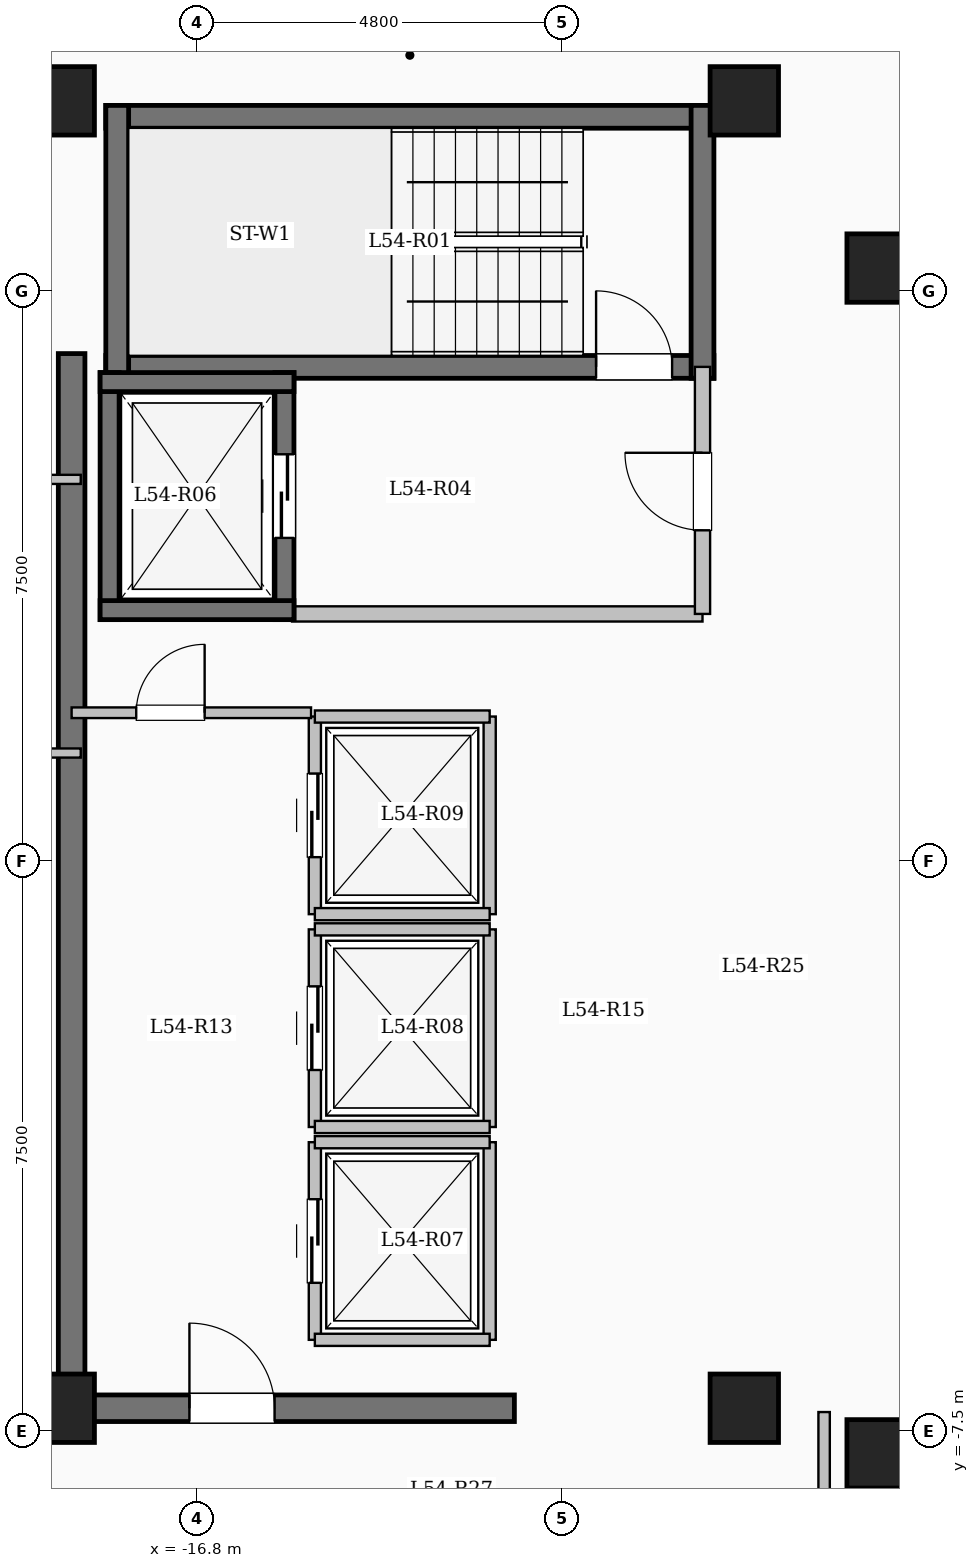
"""IFC4 building model, lengths in metres.
Left out: names, types, materials, properties, quantities, classifications, styles, units other than length and angle.
Written with IfcOpenShell. Run it as: python <this file> out.ifc"""

import sys

from ifc_helpers import new_model, si_unit, direction, frame, frame_2d, origin, origin_2d, place, context, subcontext, project, spatial, rectangle, extrude, element, fill, save


model = new_model("IFC4")
c1 = context("Model", 3, precision=1e-05, world=origin(), true_north=direction((0.0, 1.0)))
c2 = subcontext(c1, "Body", "Model", "MODEL_VIEW")
j1 = project(units=[si_unit("LENGTHUNIT", "METRE"), si_unit("PLANEANGLEUNIT", "RADIAN")], contexts=[c1])
p1 = place(None, origin())
s1 = spatial("IfcSite", under=j1, at=p1, CompositionType="ELEMENT")
p2 = place(p1, origin())
s2 = spatial("IfcBuilding", under=s1, at=p2, CompositionType="ELEMENT")
p3 = place(p2, frame((0.0, 0.0, 200.3)))
s3 = spatial("IfcBuildingStorey", under=s2, at=p3, CompositionType="ELEMENT", Elevation=200.3)
for number, where, z_axis, x_axis in (
    (1, (-7.8, -7.8, 0.0), (0.0, 0.0, 1.0), (1.0, 0.0, 0.0)),
    (2, (-7.8, 7.8, 0.0), (0.0, 0.0, 1.0), (1.0, 0.0, 0.0)),
    (3, (-9.6, -7.2, 0.0), (0.0, 0.0, 1.0), (1.0, 0.0, 0.0)),
    (4, (-9.6, 10.0, 0.0), (0.0, 0.0, 1.0), (1.0, 0.0, 0.0)),
    (5, (-18.6, -7.2, 0.0), (0.0, 0.0, 1.0), (1.0, 0.0, 0.0)),
    (6, (-18.6, 10.0, 0.0), (0.0, 0.0, 1.0), (1.0, 0.0, 0.0)),
):
    element("IfcColumn", number, at=place(p3, frame(where, z_axis=z_axis, x_axis=x_axis)), inside=s3, PredefinedType="COLUMN", context=c2, shape_type="SweptSolid", body=[
        extrude(rectangle(XDim=0.9, YDim=0.9, at=origin_2d()), origin(), (0.0, 0.0, 1.0), 3.35),
    ])
p4 = place(p3, frame((-18.0, 9.79, 0.0), z_axis=(0.0, 0.0, 1.0), x_axis=(1.0, 0.0, 0.0)))
e7 = element("IfcWall", 7, at=p4, inside=s3, PredefinedType="SHEAR", context=c2, shape_type="SweptSolid", body=[
    extrude(rectangle(XDim=8.0, YDim=0.3, at=frame_2d((4.0, 0.0))), origin(), (0.0, 0.0, 1.0), 3.35),
])
p5 = place(p3, frame((-18.0, 6.5, 0.0), z_axis=(0.0, 0.0, 1.0), x_axis=(1.0, 0.0, 0.0)))
e8 = element("IfcWall", 8, at=p5, inside=s3, PredefinedType="SHEAR", context=c2, shape_type="SweptSolid", body=[
    extrude(rectangle(XDim=8.0, YDim=0.3, at=frame_2d((4.0, 0.0))), origin(), (0.0, 0.0, 1.0), 3.35),
])
p6 = place(p5, frame((6.45, 0.0, 0.0)))
e9 = element("IfcOpeningElement", 9, at=p6, cuts=e8, PredefinedType="OPENING", context=c2, shape_type="SweptSolid", body=[
    extrude(rectangle(XDim=1.0, YDim=2.15, at=frame_2d((0.5, 1.075))), frame((0.0, 0.16, 0.0), z_axis=(0.0, -1.0, 0.0), x_axis=(1.0, 0.0, 0.0)), (0.0, 0.0, 1.0), 0.32),
])
for number, where, z_axis, x_axis in (
    (10, (-17.85, 6.35, 0.0), (0.0, 0.0, 1.0), (0.0, 1.0, 0.0)),
    (11, (-10.15, 6.35, 0.0), (0.0, 0.0, 1.0), (0.0, 1.0, 0.0)),
):
    element("IfcWall", number, at=place(p3, frame(where, z_axis=z_axis, x_axis=x_axis)), inside=s3, PredefinedType="SHEAR", context=c2, shape_type="SweptSolid", body=[
        extrude(rectangle(XDim=3.59, YDim=0.3, at=frame_2d((1.795, 0.0))), origin(), (0.0, 0.0, 1.0), 3.35),
    ])
p7 = place(p3, frame((-15.55, 3.25, 0.0), z_axis=(0.0, 0.0, 1.0), x_axis=(1.0, 0.0, 0.0)))
e12 = element("IfcWall", 12, at=p7, inside=s3, PredefinedType="SOLIDWALL", context=c2, shape_type="SweptSolid", body=[
    extrude(rectangle(XDim=5.4, YDim=0.2, at=frame_2d((2.7, 0.0))), origin(), (0.0, 0.0, 1.0), 3.1),
])
p8 = place(p3, frame((-10.15, 3.25, 0.0), z_axis=(0.0, 0.0, 1.0), x_axis=(0.0, 1.0, 0.0)))
e13 = element("IfcWall", 13, at=p8, inside=s3, PredefinedType="SOLIDWALL", context=c2, shape_type="SweptSolid", body=[
    extrude(rectangle(XDim=3.25, YDim=0.2, at=frame_2d((1.625, 0.0))), origin(), (0.0, 0.0, 1.0), 3.1),
])
p9 = place(p8, frame((1.1, 0.0, 0.0)))
e14 = element("IfcOpeningElement", 14, at=p9, cuts=e13, PredefinedType="OPENING", context=c2, shape_type="SweptSolid", body=[
    extrude(rectangle(XDim=1.02, YDim=2.15, at=frame_2d((0.51, 1.075))), frame((0.0, 0.11, 0.0), z_axis=(0.0, -1.0, 0.0), x_axis=(1.0, 0.0, 0.0)), (0.0, 0.0, 1.0), 0.22),
])
p10 = place(p3, frame((-17.95, 3.175, 0.0), z_axis=(0.0, 0.0, 1.0), x_axis=(0.0, 1.0, 0.0)))
e15 = element("IfcWall", 15, at=p10, inside=s3, PredefinedType="SHEAR", context=c2, shape_type="SweptSolid", body=[
    extrude(rectangle(XDim=3.25, YDim=0.25, at=frame_2d((1.625, 0.0))), origin(), (0.0, 0.0, 1.0), 3.35),
])
p11 = place(p3, frame((-15.65, 3.175, 0.0), z_axis=(0.0, 0.0, 1.0), x_axis=(0.0, 1.0, 0.0)))
e16 = element("IfcWall", 16, at=p11, inside=s3, PredefinedType="SHEAR", context=c2, shape_type="SweptSolid", body=[
    extrude(rectangle(XDim=3.25, YDim=0.25, at=frame_2d((1.625, 0.0))), origin(), (0.0, 0.0, 1.0), 3.35),
])
p12 = place(p11, frame((1.075, 0.0, 0.0)))
e17 = element("IfcOpeningElement", 17, at=p12, cuts=e16, PredefinedType="OPENING", context=c2, shape_type="SweptSolid", body=[
    extrude(rectangle(XDim=1.1, YDim=2.15, at=frame_2d((0.55, 1.075))), frame((0.0, 0.135, 0.0), z_axis=(0.0, -1.0, 0.0), x_axis=(1.0, 0.0, 0.0)), (0.0, 0.0, 1.0), 0.27),
])
for number, where, z_axis, x_axis in (
    (18, (-18.075, 3.3, 0.0), (0.0, 0.0, 1.0), (1.0, 0.0, 0.0)),
    (19, (-18.075, 6.3, 0.0), (0.0, 0.0, 1.0), (1.0, 0.0, 0.0)),
):
    element("IfcWall", number, at=place(p3, frame(where, z_axis=z_axis, x_axis=x_axis)), inside=s3, PredefinedType="SHEAR", context=c2, shape_type="SweptSolid", body=[
        extrude(rectangle(XDim=2.55, YDim=0.25, at=frame_2d((1.275, 0.0))), origin(), (0.0, 0.0, 1.0), 3.35),
    ])
p13 = place(p3, frame((-15.25, -6.3, 0.0), z_axis=(0.0, 0.0, 1.0), x_axis=(0.0, 1.0, 0.0)))
e20 = element("IfcWall", 20, at=p13, inside=s3, PredefinedType="SOLIDWALL", context=c2, shape_type="SweptSolid", body=[
    extrude(rectangle(XDim=2.6, YDim=0.16, at=frame_2d((1.3, 0.0))), origin(), (0.0, 0.0, 1.0), 3.1),
])
p14 = place(p13, frame((0.75, 0.0, 0.0)))
e21 = element("IfcOpeningElement", 21, at=p14, cuts=e20, PredefinedType="OPENING", context=c2, shape_type="SweptSolid", body=[
    extrude(rectangle(XDim=1.1, YDim=2.15, at=frame_2d((0.55, 1.075))), frame((0.0, 0.09, 0.0), z_axis=(0.0, -1.0, 0.0), x_axis=(1.0, 0.0, 0.0)), (0.0, 0.0, 1.0), 0.18),
])
p15 = place(p3, frame((-12.95, -6.3, 0.0), z_axis=(0.0, 0.0, 1.0), x_axis=(0.0, 1.0, 0.0)))
e22 = element("IfcWall", 22, at=p15, inside=s3, PredefinedType="SOLIDWALL", context=c2, shape_type="SweptSolid", body=[
    extrude(rectangle(XDim=2.6, YDim=0.16, at=frame_2d((1.3, 0.0))), origin(), (0.0, 0.0, 1.0), 3.1),
])
for number, where, z_axis, x_axis in (
    (23, (-15.25, -6.3, 0.0), (0.0, 0.0, 1.0), (1.0, 0.0, 0.0)),
    (24, (-15.25, -3.7, 0.0), (0.0, 0.0, 1.0), (1.0, 0.0, 0.0)),
):
    element("IfcWall", number, at=place(p3, frame(where, z_axis=z_axis, x_axis=x_axis)), inside=s3, PredefinedType="SOLIDWALL", context=c2, shape_type="SweptSolid", body=[
        extrude(rectangle(XDim=2.3, YDim=0.16, at=frame_2d((1.15, 0.0))), origin(), (0.0, 0.0, 1.0), 3.1),
    ])
p16 = place(p3, frame((-15.25, -3.5, 0.0), z_axis=(0.0, 0.0, 1.0), x_axis=(0.0, 1.0, 0.0)))
e25 = element("IfcWall", 25, at=p16, inside=s3, PredefinedType="SOLIDWALL", context=c2, shape_type="SweptSolid", body=[
    extrude(rectangle(XDim=2.6, YDim=0.16, at=frame_2d((1.3, 0.0))), origin(), (0.0, 0.0, 1.0), 3.1),
])
p17 = place(p16, frame((0.75, 0.0, 0.0)))
e26 = element("IfcOpeningElement", 26, at=p17, cuts=e25, PredefinedType="OPENING", context=c2, shape_type="SweptSolid", body=[
    extrude(rectangle(XDim=1.1, YDim=2.15, at=frame_2d((0.55, 1.075))), frame((0.0, 0.09, 0.0), z_axis=(0.0, -1.0, 0.0), x_axis=(1.0, 0.0, 0.0)), (0.0, 0.0, 1.0), 0.18),
])
p18 = place(p3, frame((-12.95, -3.5, 0.0), z_axis=(0.0, 0.0, 1.0), x_axis=(0.0, 1.0, 0.0)))
e27 = element("IfcWall", 27, at=p18, inside=s3, PredefinedType="SOLIDWALL", context=c2, shape_type="SweptSolid", body=[
    extrude(rectangle(XDim=2.6, YDim=0.16, at=frame_2d((1.3, 0.0))), origin(), (0.0, 0.0, 1.0), 3.1),
])
for number, where, z_axis, x_axis in (
    (28, (-15.25, -3.5, 0.0), (0.0, 0.0, 1.0), (1.0, 0.0, 0.0)),
    (29, (-15.25, -0.9, 0.0), (0.0, 0.0, 1.0), (1.0, 0.0, 0.0)),
):
    element("IfcWall", number, at=place(p3, frame(where, z_axis=z_axis, x_axis=x_axis)), inside=s3, PredefinedType="SOLIDWALL", context=c2, shape_type="SweptSolid", body=[
        extrude(rectangle(XDim=2.3, YDim=0.16, at=frame_2d((1.15, 0.0))), origin(), (0.0, 0.0, 1.0), 3.1),
    ])
p19 = place(p3, frame((-15.25, -0.7, 0.0), z_axis=(0.0, 0.0, 1.0), x_axis=(0.0, 1.0, 0.0)))
e30 = element("IfcWall", 30, at=p19, inside=s3, PredefinedType="SOLIDWALL", context=c2, shape_type="SweptSolid", body=[
    extrude(rectangle(XDim=2.6, YDim=0.16, at=frame_2d((1.3, 0.0))), origin(), (0.0, 0.0, 1.0), 3.1),
])
p20 = place(p19, frame((0.75, 0.0, 0.0)))
e31 = element("IfcOpeningElement", 31, at=p20, cuts=e30, PredefinedType="OPENING", context=c2, shape_type="SweptSolid", body=[
    extrude(rectangle(XDim=1.1, YDim=2.15, at=frame_2d((0.55, 1.075))), frame((0.0, 0.09, 0.0), z_axis=(0.0, -1.0, 0.0), x_axis=(1.0, 0.0, 0.0)), (0.0, 0.0, 1.0), 0.18),
])
p21 = place(p3, frame((-12.95, -0.7, 0.0), z_axis=(0.0, 0.0, 1.0), x_axis=(0.0, 1.0, 0.0)))
e32 = element("IfcWall", 32, at=p21, inside=s3, PredefinedType="SOLIDWALL", context=c2, shape_type="SweptSolid", body=[
    extrude(rectangle(XDim=2.6, YDim=0.16, at=frame_2d((1.3, 0.0))), origin(), (0.0, 0.0, 1.0), 3.1),
])
for number, where, z_axis, x_axis in (
    (33, (-15.25, -0.7, 0.0), (0.0, 0.0, 1.0), (1.0, 0.0, 0.0)),
    (34, (-15.25, 1.9, 0.0), (0.0, 0.0, 1.0), (1.0, 0.0, 0.0)),
):
    element("IfcWall", number, at=place(p3, frame(where, z_axis=z_axis, x_axis=x_axis)), inside=s3, PredefinedType="SOLIDWALL", context=c2, shape_type="SweptSolid", body=[
        extrude(rectangle(XDim=2.3, YDim=0.16, at=frame_2d((1.15, 0.0))), origin(), (0.0, 0.0, 1.0), 3.1),
    ])
p22 = place(p3, frame((-18.45, -7.375, 0.0), z_axis=(0.0, 0.0, 1.0), x_axis=(0.0, 1.0, 0.0)))
e35 = element("IfcWall", 35, at=p22, inside=s3, PredefinedType="SHEAR", context=c2, shape_type="SweptSolid", body=[
    extrude(rectangle(XDim=14.05, YDim=0.35, at=frame_2d((7.025, 0.0))), origin(), (0.0, 0.0, 1.0), 3.35),
])
p23 = place(p3, frame((-18.625, -7.2, 0.0), z_axis=(0.0, 0.0, 1.0), x_axis=(1.0, 0.0, 0.0)))
e36 = element("IfcWall", 36, at=p23, inside=s3, PredefinedType="SHEAR", context=c2, shape_type="SweptSolid", body=[
    extrude(rectangle(XDim=6.0, YDim=0.35, at=frame_2d((3.0, 0.0))), origin(), (0.0, 0.0, 1.0), 3.35),
])
p24 = place(p23, frame((1.725, 0.0, 0.0)))
e37 = element("IfcOpeningElement", 37, at=p24, cuts=e36, PredefinedType="OPENING", context=c2, shape_type="SweptSolid", body=[
    extrude(rectangle(XDim=1.12, YDim=2.15, at=frame_2d((0.56, 1.075))), frame((0.0, 0.185, 0.0), z_axis=(0.0, -1.0, 0.0), x_axis=(1.0, 0.0, 0.0)), (0.0, 0.0, 1.0), 0.37),
])
p25 = place(p3, frame((-18.45, 1.95, 0.0), z_axis=(0.0, 0.0, 1.0), x_axis=(1.0, 0.0, 0.0)))
e38 = element("IfcWall", 38, at=p25, inside=s3, PredefinedType="PARTITIONING", context=c2, shape_type="SweptSolid", body=[
    extrude(rectangle(XDim=3.15, YDim=0.14, at=frame_2d((1.575, 0.0))), origin(), (0.0, 0.0, 1.0), 3.1),
])
p26 = place(p25, frame((0.85, 0.0, 0.0)))
e39 = element("IfcOpeningElement", 39, at=p26, cuts=e38, PredefinedType="OPENING", context=c2, shape_type="SweptSolid", body=[
    extrude(rectangle(XDim=0.9, YDim=2.08, at=frame_2d((0.45, 1.04))), frame((0.0, 0.08, 0.0), z_axis=(0.0, -1.0, 0.0), x_axis=(1.0, 0.0, 0.0)), (0.0, 0.0, 1.0), 0.16),
])
p27 = place(p3, frame((-8.55, -9.4, 0.0), z_axis=(0.0, 0.0, 1.0), x_axis=(0.0, 1.0, 0.0)))
e40 = element("IfcWall", 40, at=p27, inside=s3, PredefinedType="PARTITIONING", context=c2, shape_type="SweptSolid", body=[
    extrude(rectangle(XDim=2.15, YDim=0.15, at=frame_2d((1.075, 0.0))), origin(), (0.0, 0.0, 1.0), 3.1),
])
p28 = place(p3, frame((-23.58, -7.25, 0.0), z_axis=(0.0, 0.0, 1.0), x_axis=(1.0, 0.0, 0.0)))
e41 = element("IfcWall", 41, at=p28, inside=s3, PredefinedType="PARTITIONING", context=c2, shape_type="SweptSolid", body=[
    extrude(rectangle(XDim=5.13, YDim=0.15, at=frame_2d((2.565, 0.0))), origin(), (0.0, 0.0, 1.0), 3.1),
])
p29 = place(p28, frame((2.18, 0.0, 0.0)))
e42 = element("IfcOpeningElement", 42, at=p29, cuts=e41, PredefinedType="OPENING", context=c2, shape_type="SweptSolid", body=[
    extrude(rectangle(XDim=0.96, YDim=2.15, at=frame_2d((0.48, 1.075))), frame((0.0, 0.085, 0.0), z_axis=(0.0, -1.0, 0.0), x_axis=(1.0, 0.0, 0.0)), (0.0, 0.0, 1.0), 0.17),
])
p30 = place(p3, frame((-23.7, 1.42, 0.0), z_axis=(0.0, 0.0, 1.0), x_axis=(1.0, 0.0, 0.0)))
e43 = element("IfcWall", 43, at=p30, inside=s3, PredefinedType="PARTITIONING", context=c2, shape_type="SweptSolid", body=[
    extrude(rectangle(XDim=5.37, YDim=0.12, at=frame_2d((2.685, 0.0))), origin(), (0.0, 0.0, 1.0), 3.1),
])
p31 = place(p30, frame((0.937, 0.0, 0.0)))
e44 = element("IfcOpeningElement", 44, at=p31, cuts=e43, PredefinedType="OPENING", context=c2, shape_type="SweptSolid", body=[
    extrude(rectangle(XDim=0.88, YDim=2.1, at=frame_2d((0.44, 1.05))), frame((0.0, 0.07, 0.0), z_axis=(0.0, -1.0, 0.0), x_axis=(1.0, 0.0, 0.0)), (0.0, 0.0, 1.0), 0.14),
])
p32 = place(p30, frame((3.452, 0.0, 0.0)))
e45 = element("IfcOpeningElement", 45, at=p32, cuts=e43, PredefinedType="OPENING", context=c2, shape_type="SweptSolid", body=[
    extrude(rectangle(XDim=0.88, YDim=2.1, at=frame_2d((0.44, 1.05))), frame((0.0, 0.07, 0.0), z_axis=(0.0, -1.0, 0.0), x_axis=(1.0, 0.0, 0.0)), (0.0, 0.0, 1.0), 0.14),
])
p33 = place(p3, frame((-23.7, 5.02, 0.0), z_axis=(0.0, 0.0, 1.0), x_axis=(1.0, 0.0, 0.0)))
e46 = element("IfcWall", 46, at=p33, inside=s3, PredefinedType="PARTITIONING", context=c2, shape_type="SweptSolid", body=[
    extrude(rectangle(XDim=5.37, YDim=0.12, at=frame_2d((2.685, 0.0))), origin(), (0.0, 0.0, 1.0), 3.1),
])
p34 = place(p33, frame((3.8, 0.0, 0.0)))
e47 = element("IfcOpeningElement", 47, at=p34, cuts=e46, PredefinedType="OPENING", context=c2, shape_type="SweptSolid", body=[
    extrude(rectangle(XDim=0.88, YDim=2.1, at=frame_2d((0.44, 1.05))), frame((0.0, 0.07, 0.0), z_axis=(0.0, -1.0, 0.0), x_axis=(1.0, 0.0, 0.0)), (0.0, 0.0, 1.0), 0.14),
])
p35 = place(p6, origin())
e48 = element("IfcDoor", 48, at=p35, inside=s3, OperationType="SINGLE_SWING_LEFT", PredefinedType="DOOR", context=c2, shape_type="SweptSolid", body=[
    extrude(rectangle(XDim=1.0, YDim=2.15, at=frame_2d((0.5, 1.075))), frame((0.0, 0.025, 0.0), z_axis=(0.0, -1.0, 0.0), x_axis=(1.0, 0.0, 0.0)), (0.0, 0.0, 1.0), 0.05),
])
fill(e9, e48)
p36 = place(p9, origin())
e49 = element("IfcDoor", 49, at=p36, inside=s3, OperationType="SINGLE_SWING_RIGHT", PredefinedType="DOOR", context=c2, shape_type="SweptSolid", body=[
    extrude(rectangle(XDim=1.02, YDim=2.15, at=frame_2d((0.51, 1.075))), frame((0.0, 0.025, 0.0), z_axis=(0.0, -1.0, 0.0), x_axis=(1.0, 0.0, 0.0)), (0.0, 0.0, 1.0), 0.05),
])
fill(e14, e49)
p37 = place(p12, origin())
e50 = element("IfcDoor", 50, at=p37, inside=s3, OperationType="SLIDING_TO_LEFT", PredefinedType="DOOR", context=c2, shape_type="SweptSolid", body=[
    extrude(rectangle(XDim=1.1, YDim=2.15, at=frame_2d((0.55, 1.075))), frame((0.0, 0.025, 0.0), z_axis=(0.0, -1.0, 0.0), x_axis=(1.0, 0.0, 0.0)), (0.0, 0.0, 1.0), 0.05),
])
fill(e17, e50)
p38 = place(p14, origin())
e51 = element("IfcDoor", 51, at=p38, inside=s3, OperationType="SLIDING_TO_LEFT", PredefinedType="DOOR", context=c2, shape_type="SweptSolid", body=[
    extrude(rectangle(XDim=1.1, YDim=2.15, at=frame_2d((0.55, 1.075))), frame((0.0, 0.025, 0.0), z_axis=(0.0, -1.0, 0.0), x_axis=(1.0, 0.0, 0.0)), (0.0, 0.0, 1.0), 0.05),
])
fill(e21, e51)
p39 = place(p17, origin())
e52 = element("IfcDoor", 52, at=p39, inside=s3, OperationType="SLIDING_TO_LEFT", PredefinedType="DOOR", context=c2, shape_type="SweptSolid", body=[
    extrude(rectangle(XDim=1.1, YDim=2.15, at=frame_2d((0.55, 1.075))), frame((0.0, 0.025, 0.0), z_axis=(0.0, -1.0, 0.0), x_axis=(1.0, 0.0, 0.0)), (0.0, 0.0, 1.0), 0.05),
])
fill(e26, e52)
p40 = place(p20, origin())
e53 = element("IfcDoor", 53, at=p40, inside=s3, OperationType="SLIDING_TO_LEFT", PredefinedType="DOOR", context=c2, shape_type="SweptSolid", body=[
    extrude(rectangle(XDim=1.1, YDim=2.15, at=frame_2d((0.55, 1.075))), frame((0.0, 0.025, 0.0), z_axis=(0.0, -1.0, 0.0), x_axis=(1.0, 0.0, 0.0)), (0.0, 0.0, 1.0), 0.05),
])
fill(e31, e53)
p41 = place(p24, origin())
e54 = element("IfcDoor", 54, at=p41, inside=s3, OperationType="SINGLE_SWING_LEFT", PredefinedType="DOOR", context=c2, shape_type="SweptSolid", body=[
    extrude(rectangle(XDim=1.12, YDim=2.15, at=frame_2d((0.56, 1.075))), frame((0.0, 0.025, 0.0), z_axis=(0.0, -1.0, 0.0), x_axis=(1.0, 0.0, 0.0)), (0.0, 0.0, 1.0), 0.05),
])
fill(e37, e54)
p42 = place(p26, origin())
e55 = element("IfcDoor", 55, at=p42, inside=s3, OperationType="SINGLE_SWING_RIGHT", PredefinedType="DOOR", context=c2, shape_type="SweptSolid", body=[
    extrude(rectangle(XDim=0.9, YDim=2.08, at=frame_2d((0.45, 1.04))), frame((0.0, 0.025, 0.0), z_axis=(0.0, -1.0, 0.0), x_axis=(1.0, 0.0, 0.0)), (0.0, 0.0, 1.0), 0.05),
])
fill(e39, e55)
save(model, sys.argv[1])
